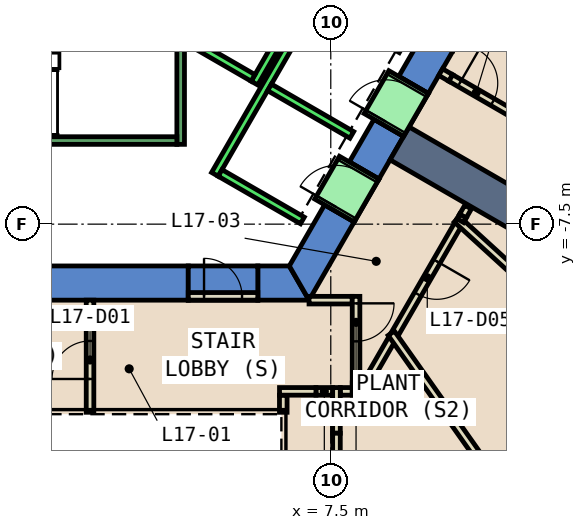
"""IFC4 building model, lengths in metres.
Left out: names, types, materials, properties, quantities, classifications, styles, units other than length and angle.
Written with IfcOpenShell. Run it as: python <this file> out.ifc"""

import sys

from ifc_helpers import new_model, si_unit, direction, frame, frame_2d, origin, place, context, subcontext, project, spatial, polyline, rectangle, outline, extrude, element, fill, save


model = new_model("IFC4")
c1 = context("Model", 3, precision=1e-05, world=origin(), true_north=direction((0.0, 1.0)))
c2 = subcontext(c1, "Body", "Model", "MODEL_VIEW")
j1 = project(units=[si_unit("LENGTHUNIT", "METRE"), si_unit("PLANEANGLEUNIT", "RADIAN")], contexts=[c1])
p1 = place(None, origin())
s1 = spatial("IfcSite", under=j1, at=p1, CompositionType="ELEMENT")
p2 = place(p1, origin())
s2 = spatial("IfcBuilding", under=s1, at=p2, CompositionType="ELEMENT")
p3 = place(p2, frame((0.0, 0.0, 81.2)))
s3 = spatial("IfcBuildingStorey", under=s2, at=p3, CompositionType="ELEMENT", Elevation=81.2)
p4 = place(p3, frame((0.0, 0.0, -0.6)))
e1 = element("IfcWall", 1, at=p4, inside=s3, PredefinedType="SHEAR", context=c2, shape_type="SweptSolid", body=[
    extrude(outline(polyline([(3.75, -9.5), (3.75, -8.6), (-6.409, -8.6), (-6.928, -9.5), (3.75, -9.5)])), origin(), (0.0, 0.0, 1.0), 5.4),
])
p5 = place(p3, frame((0.0, 0.0, -0.6)))
e2 = element("IfcWall", 2, at=p5, inside=s3, PredefinedType="SHEAR", context=c2, shape_type="SweptSolid", body=[
    extrude(outline(polyline([(5.58, -8.6), (5.58, -9.5), (6.928, -9.5), (6.409, -8.6), (5.58, -8.6)])), origin(), (0.0, 0.0, 1.0), 5.4),
])
p6 = place(p3, frame((0.0, 0.0, 3.6)))
e3 = element("IfcWall", 3, at=p6, inside=s3, PredefinedType="SHEAR", context=c2, shape_type="SweptSolid", body=[
    extrude(outline(polyline([(5.58, -9.5), (5.58, -8.6), (3.75, -8.6), (3.75, -9.5), (5.58, -9.5)])), origin(), (0.0, 0.0, 1.0), 1.2),
])
p7 = place(p3, frame((0.0, 0.0, -0.6)))
e4 = element("IfcWall", 4, at=p7, inside=s3, PredefinedType="SHEAR", context=c2, shape_type="SweptSolid", body=[
    extrude(outline(polyline([(8.117, -7.44), (7.338, -6.99), (6.409, -8.6), (6.928, -9.5), (8.117, -7.44)])), origin(), (0.0, 0.0, 1.0), 5.4),
])
p8 = place(p3, frame((0.0, 0.0, -0.6)))
e5 = element("IfcWall", 5, at=p8, inside=s3, PredefinedType="SHEAR", context=c2, shape_type="SweptSolid", body=[
    extrude(outline(polyline([(9.417, -5.189), (8.638, -4.739), (7.988, -5.864), (8.767, -6.314), (9.417, -5.189)])), origin(), (0.0, 0.0, 1.0), 5.4),
])
p9 = place(p3, frame((0.0, 0.0, -0.6)))
e6 = element("IfcWall", 6, at=p9, inside=s3, PredefinedType="SHEAR", context=c2, shape_type="SweptSolid", body=[
    extrude(outline(polyline([(10.717, -2.937), (9.938, -2.487), (9.288, -3.613), (10.067, -4.063), (10.717, -2.937)])), origin(), (0.0, 0.0, 1.0), 5.4),
])
p10 = place(p3, frame((0.0, 0.0, 3.6)))
e7 = element("IfcWall", 7, at=p10, inside=s3, PredefinedType="SHEAR", context=c2, shape_type="SweptSolid", body=[
    extrude(outline(polyline([(8.767, -6.314), (7.988, -5.864), (7.338, -6.99), (8.117, -7.44), (8.767, -6.314)])), origin(), (0.0, 0.0, 1.0), 1.2),
])
p11 = place(p3, frame((0.0, 0.0, 3.6)))
e8 = element("IfcWall", 8, at=p11, inside=s3, PredefinedType="SHEAR", context=c2, shape_type="SweptSolid", body=[
    extrude(outline(polyline([(10.067, -4.063), (9.288, -3.613), (8.638, -4.739), (9.417, -5.189), (10.067, -4.063)])), origin(), (0.0, 0.0, 1.0), 1.2),
])
p12 = place(p3, frame((9.31, -5.375, 0.0), z_axis=(0.0, 0.0, 1.0), x_axis=(0.866022967049, -0.500004220526, 0.0)))
e9 = element("IfcWall", 9, at=p12, inside=s3, PredefinedType="SHEAR", context=c2, shape_type="SweptSolid", body=[
    extrude(rectangle(XDim=35.802, YDim=1.0, at=frame_2d((17.901, 0.0))), origin(), (0.0, 0.0, 1.0), 4.8),
])
p13 = place(p3, frame((1.165, -12.45, 0.0), z_axis=(0.0, 0.0, 1.0), x_axis=(0.0, 1.0, 0.0)))
e10 = element("IfcWall", 10, at=p13, inside=s3, PredefinedType="PARTITIONING", context=c2, shape_type="SweptSolid", body=[
    extrude(rectangle(XDim=2.95, YDim=0.2, at=frame_2d((1.475, 0.0))), origin(), (0.0, 0.0, 1.0), 4.8),
])
p14 = place(p13, frame((0.876, 0.0, 0.0)))
e11 = element("IfcOpeningElement", 11, at=p14, cuts=e10, PredefinedType="OPENING", context=c2, shape_type="SweptSolid", body=[
    extrude(rectangle(XDim=1.0, YDim=2.1, at=frame_2d((0.5, 1.05))), frame((0.0, 0.11, 0.0), z_axis=(0.0, -1.0, 0.0), x_axis=(1.0, 0.0, 0.0)), (0.0, 0.0, 1.0), 0.22),
])
p15 = place(p3, frame((7.55, -11.9, 0.0), z_axis=(0.0, 0.0, 1.0), x_axis=(-1.0, 0.0, 0.0)))
e12 = element("IfcWall", 12, at=p15, inside=s3, PredefinedType="PARTITIONING", context=c2, shape_type="SweptSolid", body=[
    extrude(rectangle(XDim=0.44, YDim=0.2, at=frame_2d((0.22, 0.0))), origin(), (0.0, 0.0, 1.0), 2.4),
])
p16 = place(p3, frame((6.25, -12.0, 0.0), z_axis=(0.0, 0.0, 1.0), x_axis=(0.0, -1.0, 0.0)))
e13 = element("IfcWall", 13, at=p16, inside=s3, PredefinedType="PARTITIONING", context=c2, shape_type="SweptSolid", body=[
    extrude(rectangle(XDim=0.45, YDim=0.2, at=frame_2d((0.225, 0.0))), origin(), (0.0, 0.0, 1.0), 4.8),
])
p17 = place(p3, frame((6.928, -9.5, 0.0), z_axis=(0.0, 0.0, 1.0), x_axis=(1.0, 0.0, 0.0)))
e14 = element("IfcWall", 14, at=p17, inside=s3, PredefinedType="PARTITIONING", context=c2, shape_type="SweptSolid", body=[
    extrude(rectangle(XDim=1.137, YDim=0.2, at=frame_2d((0.568, 0.0))), origin(), (0.0, 0.0, 1.0), 4.8),
])
p18 = place(p3, frame((8.165, -9.4, 0.0), z_axis=(0.0, 0.0, 1.0), x_axis=(0.0, -1.0, 0.0)))
e15 = element("IfcWall", 15, at=p18, inside=s3, PredefinedType="PARTITIONING", context=c2, shape_type="SweptSolid", body=[
    extrude(rectangle(XDim=2.278, YDim=0.2, at=frame_2d((1.139, 0.0))), origin(), (0.0, 0.0, 1.0), 4.8),
])
p19 = place(p18, frame((0.184, 0.0, 0.0)))
e16 = element("IfcOpeningElement", 16, at=p19, cuts=e15, PredefinedType="OPENING", context=c2, shape_type="SweptSolid", body=[
    extrude(rectangle(XDim=1.0, YDim=2.1, at=frame_2d((0.5, 1.05))), frame((0.0, 0.11, 0.0), z_axis=(0.0, -1.0, 0.0), x_axis=(1.0, 0.0, 0.0)), (0.0, 0.0, 1.0), 0.22),
])
p20 = place(p3, frame((8.065, -11.9, 0.0), z_axis=(0.0, 0.0, 1.0), x_axis=(-1.0, 0.0, 0.0)))
e17 = element("IfcWall", 17, at=p20, inside=s3, PredefinedType="PARTITIONING", context=c2, shape_type="SweptSolid", body=[
    extrude(rectangle(XDim=0.315, YDim=0.2, at=frame_2d((0.157, 0.0))), origin(), (0.0, 0.0, 1.0), 2.4),
])
p21 = place(p3, frame((7.65, -11.8, 0.0), z_axis=(0.0, 0.0, 1.0), x_axis=(0.0, -1.0, 0.0)))
e18 = element("IfcWall", 18, at=p21, inside=s3, PredefinedType="PARTITIONING", context=c2, shape_type="SweptSolid", body=[
    extrude(rectangle(XDim=1.201, YDim=0.2, at=frame_2d((0.601, 0.0))), origin(), (0.0, 0.0, 1.0), 2.4),
])
p22 = place(p3, frame((9.15, -10.451, 0.0), z_axis=(0.0, 0.0, 1.0), x_axis=(-0.499619156193, -0.866245172434, 0.0)))
e19 = element("IfcWall", 19, at=p22, inside=s3, PredefinedType="PARTITIONING", context=c2, shape_type="SweptSolid", body=[
    extrude(rectangle(XDim=1.773, YDim=0.2, at=frame_2d((0.887, 0.0))), origin(), (0.0, 0.0, 1.0), 4.8),
])
p23 = place(p3, frame((10.89, -7.437, 0.0), z_axis=(0.0, 0.0, 1.0), x_axis=(-0.499979528911, -0.866037222451, 0.0)))
e20 = element("IfcWall", 20, at=p23, inside=s3, PredefinedType="PARTITIONING", context=c2, shape_type="SweptSolid", body=[
    extrude(rectangle(XDim=3.48, YDim=0.2, at=frame_2d((1.74, 0.0))), origin(), (0.0, 0.0, 1.0), 4.8),
])
p24 = place(p23, frame((1.202, 0.0, 0.0)))
e21 = element("IfcOpeningElement", 21, at=p24, cuts=e20, PredefinedType="OPENING", context=c2, shape_type="SweptSolid", body=[
    extrude(rectangle(XDim=1.0, YDim=2.1, at=frame_2d((0.5, 1.05))), frame((0.0, 0.11, 0.0), z_axis=(0.0, -1.0, 0.0), x_axis=(1.0, 0.0, 0.0)), (0.0, 0.0, 1.0), 0.22),
])
p25 = place(p3, frame((11.113, -7.051, 0.0), z_axis=(0.0, 0.0, 1.0), x_axis=(-0.500262741071, -0.865873657005, 0.0)))
e22 = element("IfcWall", 22, at=p25, inside=s3, PredefinedType="PARTITIONING", context=c2, shape_type="SweptSolid", body=[
    extrude(rectangle(XDim=0.274, YDim=0.2, at=frame_2d((0.137, 0.0))), origin(), (0.0, 0.0, 1.0), 4.8),
])
p26 = place(p3, frame((9.092, -10.37, 0.0), z_axis=(0.0, 0.0, 1.0), x_axis=(0.577082807178, -0.816685639435, 0.0)))
e23 = element("IfcWall", 23, at=p26, inside=s3, PredefinedType="PARTITIONING", context=c2, shape_type="SweptSolid", body=[
    extrude(rectangle(XDim=23.646, YDim=0.2, at=frame_2d((11.823, 0.0))), origin(), (0.0, 0.0, 1.0), 4.8),
])
p27 = place(p3, frame((10.816, -7.37, 0.0), z_axis=(0.0, 0.0, 1.0), x_axis=(0.738759145077, -0.673969528662, 0.0)))
e24 = element("IfcWall", 24, at=p27, inside=s3, PredefinedType="PARTITIONING", context=c2, shape_type="SweptSolid", body=[
    extrude(rectangle(XDim=11.779, YDim=0.2, at=frame_2d((5.89, 0.0))), origin(), (0.0, 0.0, 1.0), 2.0),
])
p28 = place(p3, frame((10.392, -3.5, 0.0), z_axis=(0.0, 0.0, 1.0), x_axis=(0.865244904171, -0.501349434832, 0.0)))
e25 = element("IfcWall", 25, at=p28, inside=s3, PredefinedType="PARTITIONING", context=c2, shape_type="SweptSolid", body=[
    extrude(rectangle(XDim=0.307, YDim=0.2, at=frame_2d((0.154, 0.0))), origin(), (0.0, 0.0, 1.0), 1.7),
])
p29 = place(p3, frame((3.75, -9.4, 0.0), z_axis=(0.0, 0.0, 1.0), x_axis=(1.0, 0.0, 0.0)))
e26 = element("IfcWall", 26, at=p29, inside=s3, PredefinedType="PARTITIONING", context=c2, shape_type="SweptSolid", body=[
    extrude(rectangle(XDim=1.83, YDim=0.2, at=frame_2d((0.915, 0.0))), origin(), (0.0, 0.0, 1.0), 2.4),
])
p30 = place(p29, frame((0.415, 0.0, 0.0)))
e27 = element("IfcOpeningElement", 27, at=p30, cuts=e26, PredefinedType="OPENING", context=c2, shape_type="SweptSolid", body=[
    extrude(rectangle(XDim=1.0, YDim=2.1, at=frame_2d((0.5, 1.05))), frame((0.0, 0.11, 0.0), z_axis=(0.0, -1.0, 0.0), x_axis=(1.0, 0.0, 0.0)), (0.0, 0.0, 1.0), 0.22),
])
p31 = place(p3, frame((7.11, -11.9, 0.0), z_axis=(0.0, 0.0, 1.0), x_axis=(-1.0, 0.0, 0.0)))
e28 = element("IfcWall", 28, at=p31, inside=s3, PredefinedType="PARTITIONING", context=c2, shape_type="SweptSolid", body=[
    extrude(rectangle(XDim=0.959, YDim=0.2, at=frame_2d((0.479, 0.0))), origin(), (0.0, 0.0, 1.0), 4.8),
])
p32 = place(p3, frame((8.165, -11.678, 0.0), z_axis=(0.0, 0.0, 1.0), x_axis=(0.0, -1.0, 0.0)))
e29 = element("IfcWall", 29, at=p32, inside=s3, PredefinedType="PARTITIONING", context=c2, shape_type="SweptSolid", body=[
    extrude(rectangle(XDim=0.322, YDim=0.2, at=frame_2d((0.161, 0.0))), origin(), (0.0, 0.0, 1.0), 2.4),
])
p33 = place(p3, frame((7.65, -13.001, 0.0), z_axis=(0.0, 0.0, 1.0), x_axis=(0.0, -1.0, 0.0)))
e30 = element("IfcWall", 30, at=p33, inside=s3, PredefinedType="PARTITIONING", context=c2, shape_type="SweptSolid", body=[
    extrude(rectangle(XDim=9.815, YDim=0.2, at=frame_2d((4.907, 0.0))), origin(), (0.0, 0.0, 1.0), 4.8),
])
p34 = place(p33, frame((7.362, 0.0, 0.0)))
e31 = element("IfcOpeningElement", 31, at=p34, cuts=e30, PredefinedType="OPENING", context=c2, shape_type="SweptSolid", body=[
    extrude(rectangle(XDim=1.0, YDim=2.1, at=frame_2d((0.5, 1.05))), frame((0.0, 0.11, 0.0), z_axis=(0.0, -1.0, 0.0), x_axis=(1.0, 0.0, 0.0)), (0.0, 0.0, 1.0), 0.22),
])
p35 = place(p3, frame((10.976, -7.288, 0.0), z_axis=(0.0, 0.0, 1.0), x_axis=(-0.50243530011, -0.86461480973, 0.0)))
e32 = element("IfcWall", 32, at=p35, inside=s3, PredefinedType="PARTITIONING", context=c2, shape_type="SweptSolid", body=[
    extrude(rectangle(XDim=0.137, YDim=0.2, at=frame_2d((0.069, 0.0))), origin(), (0.0, 0.0, 1.0), 2.0),
])
p36 = place(p3, frame((10.658, -3.654, 0.0), z_axis=(0.0, 0.0, 1.0), x_axis=(0.866074224396, -0.499915430684, 0.0)))
e33 = element("IfcWall", 33, at=p36, inside=s3, PredefinedType="PARTITIONING", context=c2, shape_type="SweptSolid", body=[
    extrude(rectangle(XDim=2.19, YDim=0.2, at=frame_2d((1.095, 0.0))), origin(), (0.0, 0.0, 1.0), 4.8),
])
p37 = place(p36, frame((0.272, 0.0, 0.0)))
e34 = element("IfcOpeningElement", 34, at=p37, cuts=e33, PredefinedType="OPENING", context=c2, shape_type="SweptSolid", body=[
    extrude(rectangle(XDim=1.0, YDim=2.1, at=frame_2d((0.5, 1.05))), frame((0.0, 0.11, 0.0), z_axis=(0.0, -1.0, 0.0), x_axis=(1.0, 0.0, 0.0)), (0.0, 0.0, 1.0), 0.22),
])
p38 = place(p3, frame((5.492, -3.788, 0.0), z_axis=(0.0, 0.0, 1.0), x_axis=(0.500011755427, 0.866018616679, 0.0)))
e35 = element("IfcWall", 35, at=p38, inside=s3, PredefinedType="STANDARD", context=c2, shape_type="SweptSolid", body=[
    extrude(rectangle(XDim=2.8, YDim=0.2, at=frame_2d((1.4, 0.0))), origin(), (0.0, 0.0, 1.0), 4.8),
])
p39 = place(p3, frame((3.377, -2.452, 0.0), z_axis=(0.0, 0.0, 1.0), x_axis=(0.865955154139, -0.50012165622, 0.0)))
e36 = element("IfcWall", 36, at=p39, inside=s3, PredefinedType="STANDARD", context=c2, shape_type="SweptSolid", body=[
    extrude(rectangle(XDim=2.4, YDim=0.2, at=frame_2d((1.2, 0.0))), origin(), (0.0, 0.0, 1.0), 4.8),
])
p40 = place(p3, frame((4.451, -6.19, 0.0), z_axis=(0.0, 0.0, 1.0), x_axis=(0.50000090737, 0.866024879913, 0.0)))
e37 = element("IfcWall", 37, at=p40, inside=s3, PredefinedType="STANDARD", context=c2, shape_type="SweptSolid", body=[
    extrude(rectangle(XDim=10.6, YDim=0.2, at=frame_2d((5.3, 0.0))), origin(), (0.0, 0.0, 1.0), 4.8),
])
for number, where, z_axis, x_axis in (
    (38, (4.588, -6.153, 0.0), (0.0, 0.0, 1.0), (0.866, -0.5, 0.0)),
    (39, (5.888, -3.902, 0.0), (0.0, 0.0, 1.0), (0.866, -0.5, 0.0)),
):
    element("IfcWall", number, at=place(p3, frame(where, z_axis=z_axis, x_axis=x_axis)), inside=s3, PredefinedType="STANDARD", context=c2, shape_type="SweptSolid", body=[
        extrude(rectangle(XDim=2.5, YDim=0.2, at=frame_2d((1.25, 0.0))), origin(), (0.0, 0.0, 1.0), 4.8),
    ])
p41 = place(p3, frame((7.598, -7.14, 0.0), z_axis=(0.0, 0.0, 1.0), x_axis=(0.500362116554, 0.865816234728, 0.0)))
e40 = element("IfcWall", 40, at=p41, inside=s3, PredefinedType="STANDARD", context=c2, shape_type="SweptSolid", body=[
    extrude(rectangle(XDim=1.299, YDim=1.2, at=frame_2d((0.65, 0.0))), origin(), (0.0, 0.0, 1.0), 2.4),
])
p42 = place(p41, frame((0.1, 0.0, 0.0)))
e41 = element("IfcOpeningElement", 41, at=p42, cuts=e40, PredefinedType="OPENING", context=c2, shape_type="SweptSolid", body=[
    extrude(rectangle(XDim=1.1, YDim=2.3, at=frame_2d((0.55, 1.15))), frame((0.0, 0.61, 0.0), z_axis=(0.0, -1.0, 0.0), x_axis=(1.0, 0.0, 0.0)), (0.0, 0.0, 1.0), 1.22),
])
p43 = place(p3, frame((8.898, -4.889, 0.0), z_axis=(0.0, 0.0, 1.0), x_axis=(0.500036693733, 0.866004217611, 0.0)))
e42 = element("IfcWall", 42, at=p43, inside=s3, PredefinedType="STANDARD", context=c2, shape_type="SweptSolid", body=[
    extrude(rectangle(XDim=1.3, YDim=1.2, at=frame_2d((0.65, 0.0))), origin(), (0.0, 0.0, 1.0), 2.4),
])
p44 = place(p43, frame((0.1, 0.0, 0.0)))
e43 = element("IfcOpeningElement", 43, at=p44, cuts=e42, PredefinedType="OPENING", context=c2, shape_type="SweptSolid", body=[
    extrude(rectangle(XDim=1.1, YDim=2.3, at=frame_2d((0.55, 1.15))), frame((0.0, 0.61, 0.0), z_axis=(0.0, -1.0, 0.0), x_axis=(1.0, 0.0, 0.0)), (0.0, 0.0, 1.0), 1.22),
])
p45 = place(p3, frame((3.55, -2.667, 0.0), z_axis=(0.0, 0.0, 1.0), x_axis=(0.0, -1.0, 0.0)))
e44 = element("IfcWall", 44, at=p45, inside=s3, PredefinedType="STANDARD", context=c2, shape_type="SweptSolid", body=[
    extrude(rectangle(XDim=2.733, YDim=0.2, at=frame_2d((1.366, 0.0))), origin(), (0.0, 0.0, 1.0), 4.8),
])
p46 = place(p3, frame((-3.45, -5.3, 0.0), z_axis=(0.0, 0.0, 1.0), x_axis=(1.0, 0.0, 0.0)))
e45 = element("IfcWall", 45, at=p46, inside=s3, PredefinedType="STANDARD", context=c2, shape_type="SweptSolid", body=[
    extrude(rectangle(XDim=6.9, YDim=0.2, at=frame_2d((3.45, 0.0))), origin(), (0.0, 0.0, 1.0), 4.8),
])
p47 = place(p14, origin())
e46 = element("IfcDoor", 46, at=p47, inside=s3, OperationType="SINGLE_SWING_LEFT", PredefinedType="DOOR", context=c2, shape_type="SweptSolid", body=[
    extrude(rectangle(XDim=1.0, YDim=2.1, at=frame_2d((0.5, 1.05))), frame((0.0, 0.025, 0.0), z_axis=(0.0, -1.0, 0.0), x_axis=(1.0, 0.0, 0.0)), (0.0, 0.0, 1.0), 0.05),
])
fill(e11, e46)
p48 = place(p19, origin())
e47 = element("IfcDoor", 47, at=p48, inside=s3, OperationType="SINGLE_SWING_RIGHT", PredefinedType="DOOR", context=c2, shape_type="SweptSolid", body=[
    extrude(rectangle(XDim=1.0, YDim=2.1, at=frame_2d((0.5, 1.05))), frame((0.0, 0.025, 0.0), z_axis=(0.0, -1.0, 0.0), x_axis=(1.0, 0.0, 0.0)), (0.0, 0.0, 1.0), 0.05),
])
fill(e16, e47)
p49 = place(p24, origin())
e48 = element("IfcDoor", 48, at=p49, inside=s3, OperationType="SINGLE_SWING_LEFT", PredefinedType="DOOR", context=c2, shape_type="SweptSolid", body=[
    extrude(rectangle(XDim=1.0, YDim=2.1, at=frame_2d((0.5, 1.05))), frame((0.0, 0.025, 0.0), z_axis=(0.0, -1.0, 0.0), x_axis=(1.0, 0.0, 0.0)), (0.0, 0.0, 1.0), 0.05),
])
fill(e21, e48)
p50 = place(p37, origin())
e49 = element("IfcDoor", 49, at=p50, inside=s3, OperationType="SINGLE_SWING_LEFT", PredefinedType="DOOR", context=c2, shape_type="SweptSolid", body=[
    extrude(rectangle(XDim=1.0, YDim=2.1, at=frame_2d((0.5, 1.05))), frame((0.0, 0.025, 0.0), z_axis=(0.0, -1.0, 0.0), x_axis=(1.0, 0.0, 0.0)), (0.0, 0.0, 1.0), 0.05),
])
fill(e34, e49)
p51 = place(p30, origin())
e50 = element("IfcDoor", 50, at=p51, inside=s3, OperationType="SINGLE_SWING_LEFT", PredefinedType="DOOR", context=c2, shape_type="SweptSolid", body=[
    extrude(rectangle(XDim=1.0, YDim=2.1, at=frame_2d((0.5, 1.05))), frame((0.0, 0.025, 0.0), z_axis=(0.0, -1.0, 0.0), x_axis=(1.0, 0.0, 0.0)), (0.0, 0.0, 1.0), 0.05),
])
fill(e27, e50)
p52 = place(p42, origin())
e51 = element("IfcDoor", 51, at=p52, inside=s3, OperationType="SLIDING_TO_LEFT", PredefinedType="DOOR", context=c2, shape_type="SweptSolid", body=[
    extrude(rectangle(XDim=1.1, YDim=2.3, at=frame_2d((0.55, 1.15))), frame((0.0, 0.025, 0.0), z_axis=(0.0, -1.0, 0.0), x_axis=(1.0, 0.0, 0.0)), (0.0, 0.0, 1.0), 0.05),
])
fill(e41, e51)
p53 = place(p44, origin())
e52 = element("IfcDoor", 52, at=p53, inside=s3, OperationType="SLIDING_TO_LEFT", PredefinedType="DOOR", context=c2, shape_type="SweptSolid", body=[
    extrude(rectangle(XDim=1.1, YDim=2.3, at=frame_2d((0.55, 1.15))), frame((0.0, 0.025, 0.0), z_axis=(0.0, -1.0, 0.0), x_axis=(1.0, 0.0, 0.0)), (0.0, 0.0, 1.0), 0.05),
])
fill(e43, e52)
save(model, sys.argv[1])
